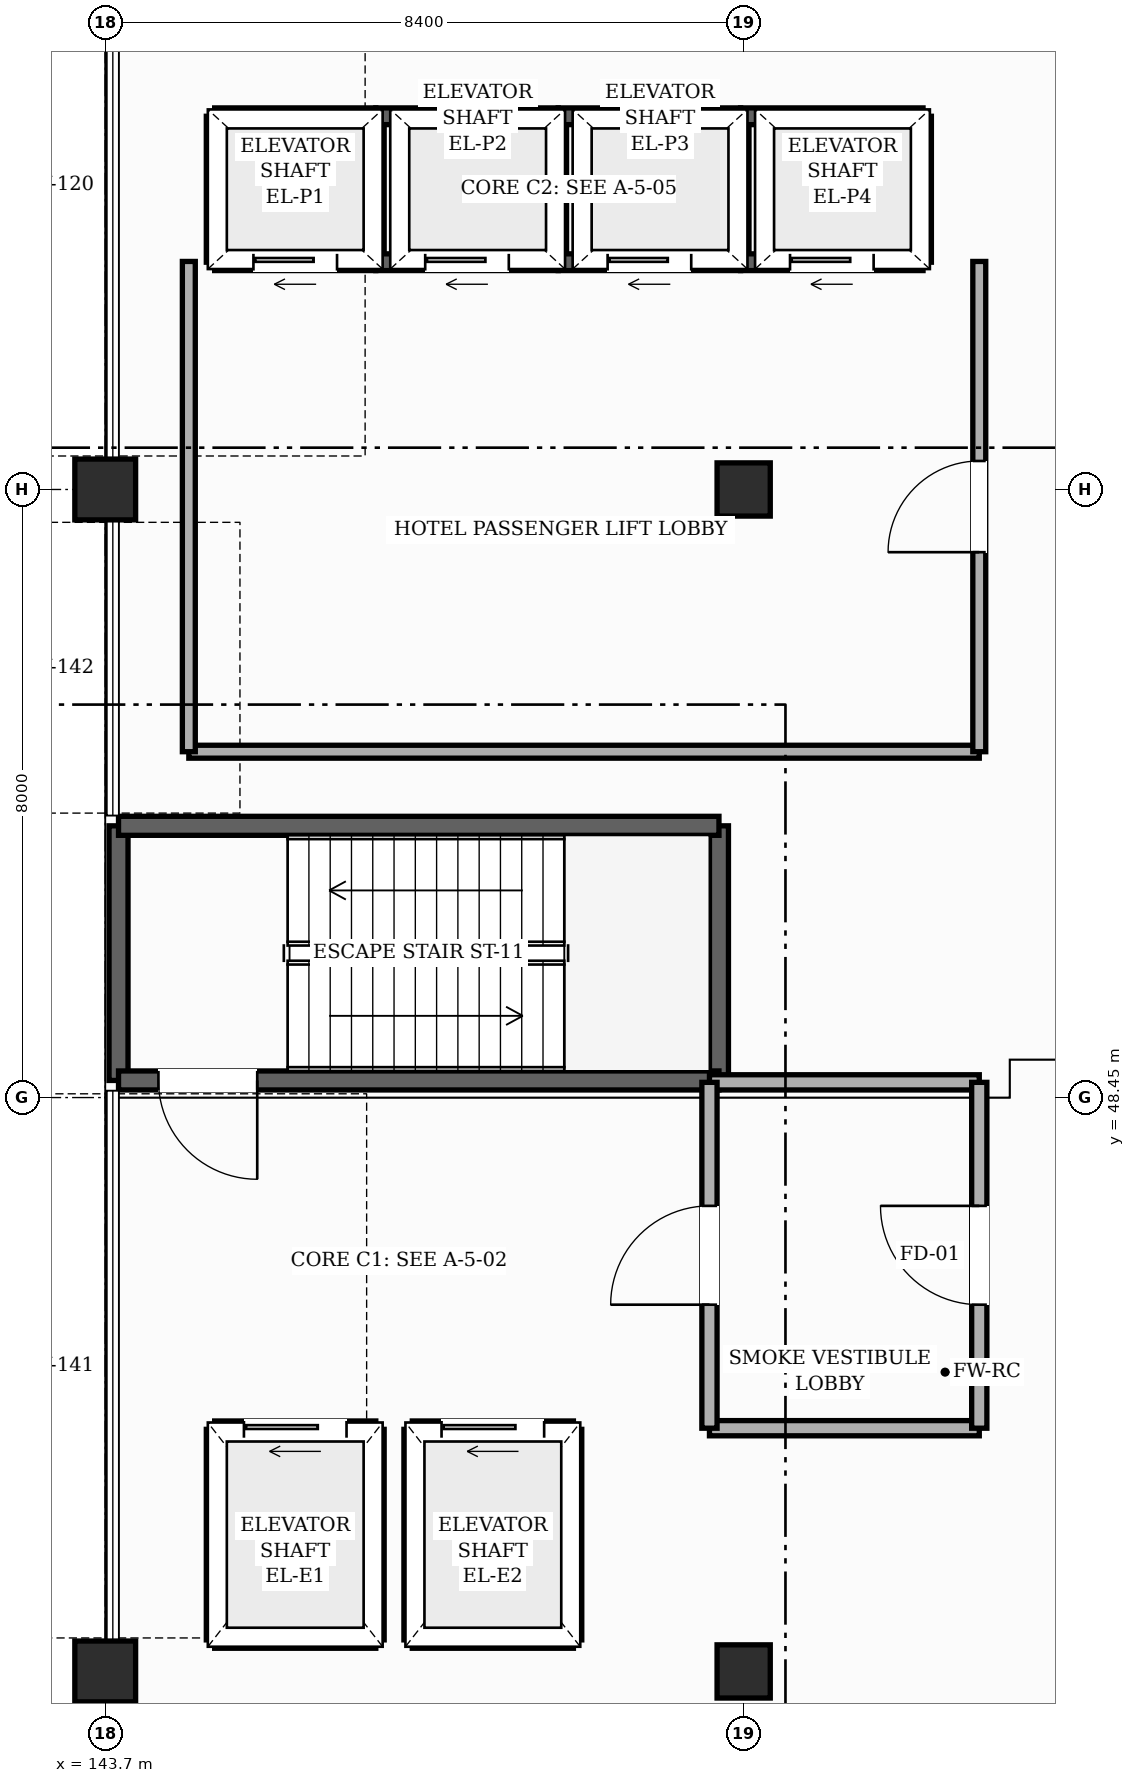
"""IFC4 building model, lengths in metres.
Left out: names, types, materials, properties, quantities, classifications, styles, units other than length and angle.
Written with IfcOpenShell. Run it as: python <this file> out.ifc"""

import sys

from ifc_helpers import new_model, si_unit, direction, frame, frame_2d, origin, origin_2d, place, context, subcontext, project, spatial, rectangle, hollow_rectangle, extrude, element, fill, save


model = new_model("IFC4")
c1 = context("Model", 3, precision=1e-05, world=origin(), true_north=direction((0.0, 1.0)))
c2 = subcontext(c1, "Body", "Model", "MODEL_VIEW")
j1 = project(units=[si_unit("LENGTHUNIT", "METRE"), si_unit("PLANEANGLEUNIT", "RADIAN")], contexts=[c1])
p1 = place(None, origin())
s1 = spatial("IfcSite", under=j1, at=p1, CompositionType="ELEMENT")
p2 = place(p1, origin())
s2 = spatial("IfcBuilding", under=s1, at=p2, CompositionType="ELEMENT")
p3 = place(p2, frame((0.0, 0.0, 10.2)))
s3 = spatial("IfcBuildingStorey", under=s2, at=p3, CompositionType="ELEMENT", Elevation=10.2)
for number, where, z_axis, x_axis in (
    (1, (143.7, 40.9, 0.0), (0.0, 0.0, 1.0), (1.0, 0.0, 0.0)),
    (2, (143.7, 56.45, 0.0), (0.0, 0.0, 1.0), (1.0, 0.0, 0.0)),
):
    element("IfcColumn", number, at=place(p3, frame(where, z_axis=z_axis, x_axis=x_axis)), inside=s3, PredefinedType="COLUMN", context=c2, shape_type="SweptSolid", body=[
        extrude(hollow_rectangle(XDim=0.8, YDim=0.8, WallThickness=0.032, InnerFilletRadius=0.032, OuterFilletRadius=0.064, at=origin_2d()), origin(), (0.0, 0.0, 1.0), 4.8),
    ])
for number, where, z_axis, x_axis in (
    (3, (152.1, 40.9, 0.0), (0.0, 0.0, 1.0), (1.0, 0.0, 0.0)),
    (4, (152.1, 56.45, 0.0), (0.0, 0.0, 1.0), (1.0, 0.0, 0.0)),
):
    element("IfcColumn", number, at=place(p3, frame(where, z_axis=z_axis, x_axis=x_axis)), inside=s3, PredefinedType="COLUMN", context=c2, shape_type="SweptSolid", body=[
        extrude(hollow_rectangle(XDim=0.7, YDim=0.7, WallThickness=0.028, InnerFilletRadius=0.028, OuterFilletRadius=0.056, at=origin_2d()), origin(), (0.0, 0.0, 1.0), 4.8),
    ])
for number, where, z_axis, x_axis in (
    (5, (143.875, 48.675, 0.0), (0.0, 0.0, 1.0), (0.0, 1.0, 0.0)),
    (6, (151.775, 52.025, 0.0), (0.0, 0.0, 1.0), (0.0, -1.0, 0.0)),
):
    element("IfcWall", number, at=place(p3, frame(where, z_axis=z_axis, x_axis=x_axis)), inside=s3, PredefinedType="SHEAR", context=c2, shape_type="SweptSolid", body=[
        extrude(rectangle(XDim=3.35, YDim=0.25, at=frame_2d((1.675, 0.0))), origin(), (0.0, 0.0, 1.0), 4.56),
    ])
p4 = place(p3, frame((151.775, 48.675, 0.0), z_axis=(0.0, 0.0, 1.0), x_axis=(-1.0, 0.0, 0.0)))
e7 = element("IfcWall", 7, at=p4, inside=s3, PredefinedType="SHEAR", context=c2, shape_type="SweptSolid", body=[
    extrude(rectangle(XDim=7.9, YDim=0.25, at=frame_2d((3.95, 0.0))), origin(), (0.0, 0.0, 1.0), 4.56),
])
p5 = place(p4, frame((6.075, 0.0, 0.0)))
e8 = element("IfcOpeningElement", 8, at=p5, cuts=e7, PredefinedType="OPENING", context=c2, shape_type="SweptSolid", body=[
    extrude(rectangle(XDim=1.3, YDim=2.2, at=frame_2d((0.65, 1.1))), frame((0.0, 0.135, 0.0), z_axis=(0.0, -1.0, 0.0), x_axis=(1.0, 0.0, 0.0)), (0.0, 0.0, 1.0), 0.27),
])
p6 = place(p3, frame((143.875, 52.025, 0.0), z_axis=(0.0, 0.0, 1.0), x_axis=(1.0, 0.0, 0.0)))
e9 = element("IfcWall", 9, at=p6, inside=s3, PredefinedType="SHEAR", context=c2, shape_type="SweptSolid", body=[
    extrude(rectangle(XDim=7.9, YDim=0.25, at=frame_2d((3.95, 0.0))), origin(), (0.0, 0.0, 1.0), 4.56),
])
p7 = place(p3, frame((145.14, 44.085, 0.0), z_axis=(0.0, 0.0, 1.0), x_axis=(1.0, 0.0, 0.0)))
e10 = element("IfcWall", 10, at=p7, inside=s3, PredefinedType="SHEAR", context=c2, shape_type="SweptSolid", body=[
    extrude(rectangle(XDim=2.12, YDim=0.22, at=frame_2d((1.06, 0.0))), origin(), (0.0, 0.0, 1.0), 4.56),
])
p8 = place(p7, frame((0.385, 0.0, 0.0)))
e11 = element("IfcOpeningElement", 11, at=p8, cuts=e10, PredefinedType="OPENING", context=c2, shape_type="SweptSolid", body=[
    extrude(rectangle(XDim=1.35, YDim=2.3, at=frame_2d((0.675, 1.15))), frame((0.0, 0.12, 0.0), z_axis=(0.0, -1.0, 0.0), x_axis=(1.0, 0.0, 0.0)), (0.0, 0.0, 1.0), 0.24),
])
p9 = place(p3, frame((145.14, 41.315, 0.0), z_axis=(0.0, 0.0, 1.0), x_axis=(1.0, 0.0, 0.0)))
e12 = element("IfcWall", 12, at=p9, inside=s3, PredefinedType="SHEAR", context=c2, shape_type="SweptSolid", body=[
    extrude(rectangle(XDim=2.12, YDim=0.22, at=frame_2d((1.06, 0.0))), origin(), (0.0, 0.0, 1.0), 4.56),
])
for number, where, z_axis, x_axis in (
    (13, (147.26, 41.315, 0.0), (0.0, 0.0, 1.0), (0.0, 1.0, 0.0)),
    (14, (145.14, 41.315, 0.0), (0.0, 0.0, 1.0), (0.0, 1.0, 0.0)),
):
    element("IfcWall", number, at=place(p3, frame(where, z_axis=z_axis, x_axis=x_axis)), inside=s3, PredefinedType="SHEAR", context=c2, shape_type="SweptSolid", body=[
        extrude(rectangle(XDim=2.77, YDim=0.22, at=frame_2d((1.385, 0.0))), origin(), (0.0, 0.0, 1.0), 4.56),
    ])
p10 = place(p3, frame((147.74, 44.085, 0.0), z_axis=(0.0, 0.0, 1.0), x_axis=(1.0, 0.0, 0.0)))
e15 = element("IfcWall", 15, at=p10, inside=s3, PredefinedType="SHEAR", context=c2, shape_type="SweptSolid", body=[
    extrude(rectangle(XDim=2.12, YDim=0.22, at=frame_2d((1.06, 0.0))), origin(), (0.0, 0.0, 1.0), 4.56),
])
p11 = place(p10, frame((0.385, 0.0, 0.0)))
e16 = element("IfcOpeningElement", 16, at=p11, cuts=e15, PredefinedType="OPENING", context=c2, shape_type="SweptSolid", body=[
    extrude(rectangle(XDim=1.35, YDim=2.3, at=frame_2d((0.675, 1.15))), frame((0.0, 0.12, 0.0), z_axis=(0.0, -1.0, 0.0), x_axis=(1.0, 0.0, 0.0)), (0.0, 0.0, 1.0), 0.24),
])
p12 = place(p3, frame((147.74, 41.315, 0.0), z_axis=(0.0, 0.0, 1.0), x_axis=(1.0, 0.0, 0.0)))
e17 = element("IfcWall", 17, at=p12, inside=s3, PredefinedType="SHEAR", context=c2, shape_type="SweptSolid", body=[
    extrude(rectangle(XDim=2.12, YDim=0.22, at=frame_2d((1.06, 0.0))), origin(), (0.0, 0.0, 1.0), 4.56),
])
for number, where, z_axis, x_axis in (
    (18, (149.86, 41.315, 0.0), (0.0, 0.0, 1.0), (0.0, 1.0, 0.0)),
    (19, (147.74, 41.315, 0.0), (0.0, 0.0, 1.0), (0.0, 1.0, 0.0)),
):
    element("IfcWall", number, at=place(p3, frame(where, z_axis=z_axis, x_axis=x_axis)), inside=s3, PredefinedType="SHEAR", context=c2, shape_type="SweptSolid", body=[
        extrude(rectangle(XDim=2.77, YDim=0.22, at=frame_2d((1.385, 0.0))), origin(), (0.0, 0.0, 1.0), 4.56),
    ])
p13 = place(p3, frame((145.14, 61.36, 0.0), z_axis=(0.0, 0.0, 1.0), x_axis=(1.0, 0.0, 0.0)))
e20 = element("IfcWall", 20, at=p13, inside=s3, PredefinedType="SHEAR", context=c2, shape_type="SweptSolid", body=[
    extrude(rectangle(XDim=2.12, YDim=0.22, at=frame_2d((1.06, 0.0))), origin(), (0.0, 0.0, 1.0), 4.56),
])
p14 = place(p3, frame((145.14, 59.44, 0.0), z_axis=(0.0, 0.0, 1.0), x_axis=(1.0, 0.0, 0.0)))
e21 = element("IfcWall", 21, at=p14, inside=s3, PredefinedType="SHEAR", context=c2, shape_type="SweptSolid", body=[
    extrude(rectangle(XDim=2.12, YDim=0.22, at=frame_2d((1.06, 0.0))), origin(), (0.0, 0.0, 1.0), 4.56),
])
p15 = place(p14, frame((0.51, 0.0, 0.0)))
e22 = element("IfcOpeningElement", 22, at=p15, cuts=e21, PredefinedType="OPENING", context=c2, shape_type="SweptSolid", body=[
    extrude(rectangle(XDim=1.1, YDim=2.2, at=frame_2d((0.55, 1.1))), frame((0.0, 0.12, 0.0), z_axis=(0.0, -1.0, 0.0), x_axis=(1.0, 0.0, 0.0)), (0.0, 0.0, 1.0), 0.24),
])
for number, where, z_axis, x_axis in (
    (23, (147.26, 59.44, 0.0), (0.0, 0.0, 1.0), (0.0, 1.0, 0.0)),
    (24, (145.14, 59.44, 0.0), (0.0, 0.0, 1.0), (0.0, 1.0, 0.0)),
):
    element("IfcWall", number, at=place(p3, frame(where, z_axis=z_axis, x_axis=x_axis)), inside=s3, PredefinedType="SHEAR", context=c2, shape_type="SweptSolid", body=[
        extrude(rectangle(XDim=1.92, YDim=0.22, at=frame_2d((0.96, 0.0))), origin(), (0.0, 0.0, 1.0), 4.56),
    ])
p16 = place(p3, frame((147.26, 61.36, 0.0), z_axis=(0.0, 0.0, 1.0), x_axis=(1.0, 0.0, 0.0)))
e25 = element("IfcWall", 25, at=p16, inside=s3, PredefinedType="SHEAR", context=c2, shape_type="SweptSolid", body=[
    extrude(rectangle(XDim=2.4, YDim=0.22, at=frame_2d((1.2, 0.0))), origin(), (0.0, 0.0, 1.0), 4.56),
])
p17 = place(p3, frame((147.26, 59.44, 0.0), z_axis=(0.0, 0.0, 1.0), x_axis=(1.0, 0.0, 0.0)))
e26 = element("IfcWall", 26, at=p17, inside=s3, PredefinedType="SHEAR", context=c2, shape_type="SweptSolid", body=[
    extrude(rectangle(XDim=2.4, YDim=0.22, at=frame_2d((1.2, 0.0))), origin(), (0.0, 0.0, 1.0), 4.56),
])
p18 = place(p17, frame((0.65, 0.0, 0.0)))
e27 = element("IfcOpeningElement", 27, at=p18, cuts=e26, PredefinedType="OPENING", context=c2, shape_type="SweptSolid", body=[
    extrude(rectangle(XDim=1.1, YDim=2.2, at=frame_2d((0.55, 1.1))), frame((0.0, 0.12, 0.0), z_axis=(0.0, -1.0, 0.0), x_axis=(1.0, 0.0, 0.0)), (0.0, 0.0, 1.0), 0.24),
])
p19 = place(p3, frame((149.66, 59.44, 0.0), z_axis=(0.0, 0.0, 1.0), x_axis=(0.0, 1.0, 0.0)))
e28 = element("IfcWall", 28, at=p19, inside=s3, PredefinedType="SHEAR", context=c2, shape_type="SweptSolid", body=[
    extrude(rectangle(XDim=1.92, YDim=0.22, at=frame_2d((0.96, 0.0))), origin(), (0.0, 0.0, 1.0), 4.56),
])
p20 = place(p3, frame((149.66, 61.36, 0.0), z_axis=(0.0, 0.0, 1.0), x_axis=(1.0, 0.0, 0.0)))
e29 = element("IfcWall", 29, at=p20, inside=s3, PredefinedType="SHEAR", context=c2, shape_type="SweptSolid", body=[
    extrude(rectangle(XDim=2.4, YDim=0.22, at=frame_2d((1.2, 0.0))), origin(), (0.0, 0.0, 1.0), 4.56),
])
p21 = place(p3, frame((149.66, 59.44, 0.0), z_axis=(0.0, 0.0, 1.0), x_axis=(1.0, 0.0, 0.0)))
e30 = element("IfcWall", 30, at=p21, inside=s3, PredefinedType="SHEAR", context=c2, shape_type="SweptSolid", body=[
    extrude(rectangle(XDim=2.4, YDim=0.22, at=frame_2d((1.2, 0.0))), origin(), (0.0, 0.0, 1.0), 4.56),
])
p22 = place(p21, frame((0.65, 0.0, 0.0)))
e31 = element("IfcOpeningElement", 31, at=p22, cuts=e30, PredefinedType="OPENING", context=c2, shape_type="SweptSolid", body=[
    extrude(rectangle(XDim=1.1, YDim=2.2, at=frame_2d((0.55, 1.1))), frame((0.0, 0.12, 0.0), z_axis=(0.0, -1.0, 0.0), x_axis=(1.0, 0.0, 0.0)), (0.0, 0.0, 1.0), 0.24),
])
p23 = place(p3, frame((152.06, 59.44, 0.0), z_axis=(0.0, 0.0, 1.0), x_axis=(0.0, 1.0, 0.0)))
e32 = element("IfcWall", 32, at=p23, inside=s3, PredefinedType="SHEAR", context=c2, shape_type="SweptSolid", body=[
    extrude(rectangle(XDim=1.92, YDim=0.22, at=frame_2d((0.96, 0.0))), origin(), (0.0, 0.0, 1.0), 4.56),
])
p24 = place(p3, frame((152.06, 61.36, 0.0), z_axis=(0.0, 0.0, 1.0), x_axis=(1.0, 0.0, 0.0)))
e33 = element("IfcWall", 33, at=p24, inside=s3, PredefinedType="SHEAR", context=c2, shape_type="SweptSolid", body=[
    extrude(rectangle(XDim=2.4, YDim=0.22, at=frame_2d((1.2, 0.0))), origin(), (0.0, 0.0, 1.0), 4.56),
])
p25 = place(p3, frame((152.06, 59.44, 0.0), z_axis=(0.0, 0.0, 1.0), x_axis=(1.0, 0.0, 0.0)))
e34 = element("IfcWall", 34, at=p25, inside=s3, PredefinedType="SHEAR", context=c2, shape_type="SweptSolid", body=[
    extrude(rectangle(XDim=2.4, YDim=0.22, at=frame_2d((1.2, 0.0))), origin(), (0.0, 0.0, 1.0), 4.56),
])
p26 = place(p25, frame((0.65, 0.0, 0.0)))
e35 = element("IfcOpeningElement", 35, at=p26, cuts=e34, PredefinedType="OPENING", context=c2, shape_type="SweptSolid", body=[
    extrude(rectangle(XDim=1.1, YDim=2.2, at=frame_2d((0.55, 1.1))), frame((0.0, 0.12, 0.0), z_axis=(0.0, -1.0, 0.0), x_axis=(1.0, 0.0, 0.0)), (0.0, 0.0, 1.0), 0.24),
])
p27 = place(p3, frame((154.46, 59.44, 0.0), z_axis=(0.0, 0.0, 1.0), x_axis=(0.0, 1.0, 0.0)))
e36 = element("IfcWall", 36, at=p27, inside=s3, PredefinedType="SHEAR", context=c2, shape_type="SweptSolid", body=[
    extrude(rectangle(XDim=1.92, YDim=0.22, at=frame_2d((0.96, 0.0))), origin(), (0.0, 0.0, 1.0), 4.56),
])
for number, where, z_axis, x_axis in (
    (37, (151.65, 44.1, 0.0), (0.0, 0.0, 1.0), (1.0, 0.0, 0.0)),
    (38, (151.65, 48.65, 0.0), (0.0, 0.0, 1.0), (1.0, 0.0, 0.0)),
):
    element("IfcWall", number, at=place(p3, frame(where, z_axis=z_axis, x_axis=x_axis)), inside=s3, PredefinedType="SOLIDWALL", context=c2, shape_type="SweptSolid", body=[
        extrude(rectangle(XDim=3.55, YDim=0.2, at=frame_2d((1.775, 0.0))), origin(), (0.0, 0.0, 1.0), 4.545),
    ])
p28 = place(p3, frame((144.8, 53.0, 0.0), z_axis=(0.0, 0.0, 1.0), x_axis=(1.0, 0.0, 0.0)))
e39 = element("IfcWall", 39, at=p28, inside=s3, PredefinedType="PARTITIONING", context=c2, shape_type="SweptSolid", body=[
    extrude(rectangle(XDim=10.4, YDim=0.17, at=frame_2d((5.2, 0.0))), origin(), (0.0, 0.0, 1.0), 4.545),
])
p29 = place(p3, frame((144.8, 53.0, 0.0), z_axis=(0.0, 0.0, 1.0), x_axis=(0.0, 1.0, 0.0)))
e40 = element("IfcWall", 40, at=p29, inside=s3, PredefinedType="PARTITIONING", context=c2, shape_type="SweptSolid", body=[
    extrude(rectangle(XDim=6.45, YDim=0.17, at=frame_2d((3.225, 0.0))), origin(), (0.0, 0.0, 1.0), 4.545),
])
p30 = place(p3, frame((151.65, 44.1, 0.0), z_axis=(0.0, 0.0, 1.0), x_axis=(0.0, 1.0, 0.0)))
e41 = element("IfcWall", 41, at=p30, inside=s3, PredefinedType="SOLIDWALL", context=c2, shape_type="SweptSolid", body=[
    extrude(rectangle(XDim=4.55, YDim=0.2, at=frame_2d((2.275, 0.0))), origin(), (0.0, 0.0, 1.0), 4.545),
])
p31 = place(p30, frame((1.625, 0.0, 0.0)))
e42 = element("IfcOpeningElement", 42, at=p31, cuts=e41, PredefinedType="OPENING", context=c2, shape_type="SweptSolid", body=[
    extrude(rectangle(XDim=1.3, YDim=2.2, at=frame_2d((0.65, 1.1))), frame((0.0, 0.11, 0.0), z_axis=(0.0, -1.0, 0.0), x_axis=(1.0, 0.0, 0.0)), (0.0, 0.0, 1.0), 0.22),
])
p32 = place(p3, frame((155.2, 44.1, 0.0), z_axis=(0.0, 0.0, 1.0), x_axis=(0.0, 1.0, 0.0)))
e43 = element("IfcWall", 43, at=p32, inside=s3, PredefinedType="SOLIDWALL", context=c2, shape_type="SweptSolid", body=[
    extrude(rectangle(XDim=4.55, YDim=0.2, at=frame_2d((2.275, 0.0))), origin(), (0.0, 0.0, 1.0), 4.545),
])
p33 = place(p32, frame((1.625, 0.0, 0.0)))
e44 = element("IfcOpeningElement", 44, at=p33, cuts=e43, PredefinedType="OPENING", context=c2, shape_type="SweptSolid", body=[
    extrude(rectangle(XDim=1.3, YDim=2.2, at=frame_2d((0.65, 1.1))), frame((0.0, 0.11, 0.0), z_axis=(0.0, -1.0, 0.0), x_axis=(1.0, 0.0, 0.0)), (0.0, 0.0, 1.0), 0.22),
])
p34 = place(p3, frame((155.2, 53.0, 0.0), z_axis=(0.0, 0.0, 1.0), x_axis=(0.0, 1.0, 0.0)))
e45 = element("IfcWall", 45, at=p34, inside=s3, PredefinedType="PARTITIONING", context=c2, shape_type="SweptSolid", body=[
    extrude(rectangle(XDim=6.45, YDim=0.17, at=frame_2d((3.225, 0.0))), origin(), (0.0, 0.0, 1.0), 4.545),
])
p35 = place(p34, frame((2.625, 0.0, 0.0)))
e46 = element("IfcOpeningElement", 46, at=p35, cuts=e45, PredefinedType="OPENING", context=c2, shape_type="SweptSolid", body=[
    extrude(rectangle(XDim=1.2, YDim=2.2, at=frame_2d((0.6, 1.1))), frame((0.0, 0.095, 0.0), z_axis=(0.0, -1.0, 0.0), x_axis=(1.0, 0.0, 0.0)), (0.0, 0.0, 1.0), 0.19),
])
p36 = place(p5, origin())
e47 = element("IfcDoor", 47, at=p36, inside=s3, OperationType="SINGLE_SWING_LEFT", PredefinedType="DOOR", context=c2, shape_type="SweptSolid", body=[
    extrude(rectangle(XDim=1.3, YDim=2.2, at=frame_2d((0.65, 1.1))), frame((0.0, 0.025, 0.0), z_axis=(0.0, -1.0, 0.0), x_axis=(1.0, 0.0, 0.0)), (0.0, 0.0, 1.0), 0.05),
])
fill(e8, e47)
p37 = place(p8, origin())
e48 = element("IfcDoor", 48, at=p37, inside=s3, OperationType="SLIDING_TO_LEFT", PredefinedType="DOOR", context=c2, shape_type="SweptSolid", body=[
    extrude(rectangle(XDim=1.35, YDim=2.3, at=frame_2d((0.675, 1.15))), frame((0.0, 0.025, 0.0), z_axis=(0.0, -1.0, 0.0), x_axis=(1.0, 0.0, 0.0)), (0.0, 0.0, 1.0), 0.05),
])
fill(e11, e48)
p38 = place(p11, origin())
e49 = element("IfcDoor", 49, at=p38, inside=s3, OperationType="SLIDING_TO_LEFT", PredefinedType="DOOR", context=c2, shape_type="SweptSolid", body=[
    extrude(rectangle(XDim=1.35, YDim=2.3, at=frame_2d((0.675, 1.15))), frame((0.0, 0.025, 0.0), z_axis=(0.0, -1.0, 0.0), x_axis=(1.0, 0.0, 0.0)), (0.0, 0.0, 1.0), 0.05),
])
fill(e16, e49)
p39 = place(p15, origin())
e50 = element("IfcDoor", 50, at=p39, inside=s3, OperationType="SLIDING_TO_LEFT", PredefinedType="DOOR", context=c2, shape_type="SweptSolid", body=[
    extrude(rectangle(XDim=1.1, YDim=2.2, at=frame_2d((0.55, 1.1))), frame((0.0, 0.025, 0.0), z_axis=(0.0, -1.0, 0.0), x_axis=(1.0, 0.0, 0.0)), (0.0, 0.0, 1.0), 0.05),
])
fill(e22, e50)
p40 = place(p18, origin())
e51 = element("IfcDoor", 51, at=p40, inside=s3, OperationType="SLIDING_TO_LEFT", PredefinedType="DOOR", context=c2, shape_type="SweptSolid", body=[
    extrude(rectangle(XDim=1.1, YDim=2.2, at=frame_2d((0.55, 1.1))), frame((0.0, 0.025, 0.0), z_axis=(0.0, -1.0, 0.0), x_axis=(1.0, 0.0, 0.0)), (0.0, 0.0, 1.0), 0.05),
])
fill(e27, e51)
p41 = place(p22, origin())
e52 = element("IfcDoor", 52, at=p41, inside=s3, OperationType="SLIDING_TO_LEFT", PredefinedType="DOOR", context=c2, shape_type="SweptSolid", body=[
    extrude(rectangle(XDim=1.1, YDim=2.2, at=frame_2d((0.55, 1.1))), frame((0.0, 0.025, 0.0), z_axis=(0.0, -1.0, 0.0), x_axis=(1.0, 0.0, 0.0)), (0.0, 0.0, 1.0), 0.05),
])
fill(e31, e52)
p42 = place(p26, origin())
e53 = element("IfcDoor", 53, at=p42, inside=s3, OperationType="SLIDING_TO_LEFT", PredefinedType="DOOR", context=c2, shape_type="SweptSolid", body=[
    extrude(rectangle(XDim=1.1, YDim=2.2, at=frame_2d((0.55, 1.1))), frame((0.0, 0.025, 0.0), z_axis=(0.0, -1.0, 0.0), x_axis=(1.0, 0.0, 0.0)), (0.0, 0.0, 1.0), 0.05),
])
fill(e35, e53)
p43 = place(p31, origin())
e54 = element("IfcDoor", 54, at=p43, inside=s3, OperationType="SINGLE_SWING_LEFT", PredefinedType="DOOR", context=c2, shape_type="SweptSolid", body=[
    extrude(rectangle(XDim=1.3, YDim=2.2, at=frame_2d((0.65, 1.1))), frame((0.0, 0.025, 0.0), z_axis=(0.0, -1.0, 0.0), x_axis=(1.0, 0.0, 0.0)), (0.0, 0.0, 1.0), 0.05),
])
fill(e42, e54)
p44 = place(p33, origin())
e55 = element("IfcDoor", 55, at=p44, inside=s3, OperationType="SINGLE_SWING_RIGHT", PredefinedType="DOOR", context=c2, shape_type="SweptSolid", body=[
    extrude(rectangle(XDim=1.3, YDim=2.2, at=frame_2d((0.65, 1.1))), frame((0.0, 0.025, 0.0), z_axis=(0.0, -1.0, 0.0), x_axis=(1.0, 0.0, 0.0)), (0.0, 0.0, 1.0), 0.05),
])
fill(e44, e55)
p45 = place(p35, origin())
e56 = element("IfcDoor", 56, at=p45, inside=s3, OperationType="SINGLE_SWING_LEFT", PredefinedType="DOOR", context=c2, shape_type="SweptSolid", body=[
    extrude(rectangle(XDim=1.2, YDim=2.2, at=frame_2d((0.6, 1.1))), frame((0.0, 0.025, 0.0), z_axis=(0.0, -1.0, 0.0), x_axis=(1.0, 0.0, 0.0)), (0.0, 0.0, 1.0), 0.05),
])
fill(e46, e56)
save(model, sys.argv[1])
